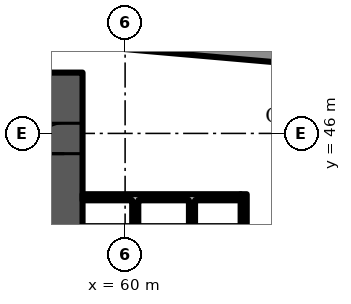
"""IFC4 building model, lengths in metres.
Left out: names, types, materials, properties, quantities, classifications, styles, units other than length and angle.
Written with IfcOpenShell. Run it as: python <this file> out.ifc"""

import sys

from ifc_helpers import new_model, si_unit, direction, frame, frame_2d, origin, place, context, subcontext, project, spatial, polyline, rectangle, outline, extrude, element, fill, save


model = new_model("IFC4")
c1 = context("Model", 3, precision=1e-05, world=origin(), true_north=direction((0.0, 1.0)))
c2 = subcontext(c1, "Body", "Model", "MODEL_VIEW")
j1 = project(units=[si_unit("LENGTHUNIT", "METRE"), si_unit("PLANEANGLEUNIT", "RADIAN")], contexts=[c1])
p1 = place(None, origin())
s1 = spatial("IfcSite", under=j1, at=p1, CompositionType="ELEMENT")
p2 = place(p1, origin())
s2 = spatial("IfcBuilding", under=s1, at=p2, CompositionType="ELEMENT")
p3 = place(p2, origin())
s3 = spatial("IfcBuildingStorey", under=s2, at=p3, CompositionType="ELEMENT", Elevation=0.0)
p4 = place(p3, frame((66.058, 48.469, 0.0), z_axis=(0.0, 0.0, 1.0), x_axis=(-0.996195, 0.087158, 0.0)))
e1 = element("IfcWall", 1, at=p4, inside=s3, PredefinedType="SOLIDWALL", context=c2, shape_type="SweptSolid", body=[
    extrude(rectangle(XDim=6.081, YDim=0.45, at=frame_2d((3.041, 0.0))), origin(), (0.0, 0.0, 1.0), 7.7),
])
p5 = place(p3, frame((58.0, 35.2, 0.0), z_axis=(0.0, 0.0, 1.0), x_axis=(0.0, 1.0, 0.0)))
e2 = element("IfcWall", 2, at=p5, inside=s3, PredefinedType="SHEAR", context=c2, shape_type="SweptSolid", body=[
    extrude(rectangle(XDim=12.8, YDim=1.2, at=frame_2d((6.4, 0.0))), origin(), (0.0, 0.0, 1.0), 7.7),
])
p6 = place(p5, frame((10.134, 0.0, 0.0)))
e3 = element("IfcOpeningElement", 3, at=p6, cuts=e2, PredefinedType="OPENING", context=c2, shape_type="SweptSolid", body=[
    extrude(rectangle(XDim=1.0, YDim=2.1, at=frame_2d((0.5, 1.05))), frame((0.0, 0.61, 0.0), z_axis=(0.0, -1.0, 0.0), x_axis=(1.0, 0.0, 0.0)), (0.0, 0.0, 1.0), 1.22),
])
p7 = place(p5, frame((3.2, 0.0, 0.0)))
e4 = element("IfcOpeningElement", 4, at=p7, cuts=e2, PredefinedType="OPENING", context=c2, shape_type="SweptSolid", body=[
    extrude(rectangle(XDim=1.1, YDim=2.1, at=frame_2d((0.55, 1.05))), frame((0.0, 0.61, 0.0), z_axis=(0.0, -1.0, 0.0), x_axis=(1.0, 0.0, 0.0)), (0.0, 0.0, 1.0), 1.22),
])
p8 = place(p3, frame((0.0, 0.0, -0.0)))
e5 = element("IfcWall", 5, at=p8, inside=s3, PredefinedType="PARTITIONING", context=c2, shape_type="SweptSolid", body=[
    extrude(outline(polyline([(60.433, 40.8), (60.233, 40.8), (60.233, 43.8), (58.6, 43.8), (58.6, 44.0), (63.8, 44.0), (63.8, 43.8), (62.3, 43.8), (62.3, 40.8), (62.1, 40.8), (62.1, 43.8), (60.433, 43.8), (60.433, 40.8)])), origin(), (0.0, 0.0, 1.0), 7.7),
])
p9 = place(p3, frame((63.9, 40.6, 0.0), z_axis=(0.0, 0.0, 1.0), x_axis=(0.0, 1.0, 0.0)))
e6 = element("IfcWall", 6, at=p9, inside=s3, PredefinedType="PARTITIONING", context=c2, shape_type="SweptSolid", body=[
    extrude(rectangle(XDim=3.4, YDim=0.2, at=frame_2d((1.7, 0.0))), origin(), (0.0, 0.0, 1.0), 7.7),
])
p10 = place(p6, origin())
e7 = element("IfcDoor", 7, at=p10, inside=s3, OperationType="SINGLE_SWING_LEFT", PredefinedType="DOOR", context=c2, shape_type="SweptSolid", body=[
    extrude(rectangle(XDim=1.0, YDim=2.1, at=frame_2d((0.5, 1.05))), frame((0.0, 0.6, 0.0), z_axis=(0.0, -1.0, 0.0), x_axis=(1.0, 0.0, 0.0)), (0.0, 0.0, 1.0), 1.199),
])
fill(e3, e7)
save(model, sys.argv[1])
